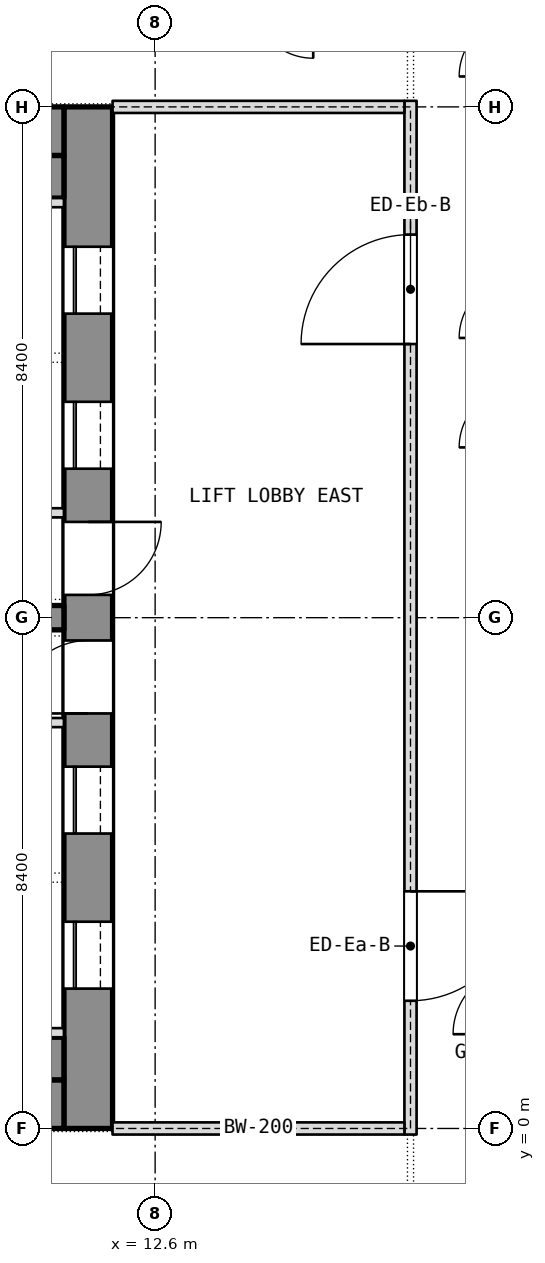
"""IFC4 building model, lengths in metres.
Left out: names, types, materials, properties, quantities, classifications, styles, units other than length and angle.
Written with IfcOpenShell. Run it as: python <this file> out.ifc"""

import sys

from ifc_helpers import new_model, si_unit, direction, frame, frame_2d, origin, place, context, subcontext, project, spatial, rectangle, extrude, element, fill, save


model = new_model("IFC4")
c1 = context("Model", 3, precision=1e-05, world=origin(), true_north=direction((0.0, 1.0)))
c2 = subcontext(c1, "Body", "Model", "MODEL_VIEW")
j1 = project(units=[si_unit("LENGTHUNIT", "METRE"), si_unit("PLANEANGLEUNIT", "RADIAN")], contexts=[c1])
p1 = place(None, origin())
s1 = spatial("IfcSite", under=j1, at=p1, CompositionType="ELEMENT")
p2 = place(p1, origin())
s2 = spatial("IfcBuilding", under=s1, at=p2, CompositionType="ELEMENT")
p3 = place(p2, frame((0.0, 0.0, 238.1)))
s3 = spatial("IfcBuildingStorey", under=s2, at=p3, CompositionType="ELEMENT", Elevation=238.1)
p4 = place(p3, frame((11.5, 0.0, 0.0), z_axis=(0.0, 0.0, 1.0), x_axis=(0.0, 1.0, 0.0)))
e1 = element("IfcWall", 1, at=p4, inside=s3, PredefinedType="SHEAR", context=c2, shape_type="SweptSolid", body=[
    extrude(rectangle(XDim=16.8, YDim=0.8, at=frame_2d((8.4, 0.0))), origin(), (0.0, 0.0, 1.0), 3.6),
])
p5 = place(p4, frame((2.3, 0.0, 0.0)))
e2 = element("IfcOpeningElement", 2, at=p5, cuts=e1, PredefinedType="OPENING", context=c2, shape_type="SweptSolid", body=[
    extrude(rectangle(XDim=1.1, YDim=2.1, at=frame_2d((0.55, 1.05))), frame((0.0, 0.4, 0.0), z_axis=(0.0, -1.0, 0.0), x_axis=(1.0, 0.0, 0.0)), (0.0, 0.0, 1.0), 0.8),
])
p6 = place(p4, frame((4.85, 0.0, 0.0)))
e3 = element("IfcOpeningElement", 3, at=p6, cuts=e1, PredefinedType="OPENING", context=c2, shape_type="SweptSolid", body=[
    extrude(rectangle(XDim=1.1, YDim=2.1, at=frame_2d((0.55, 1.05))), frame((0.0, 0.4, 0.0), z_axis=(0.0, -1.0, 0.0), x_axis=(1.0, 0.0, 0.0)), (0.0, 0.0, 1.0), 0.8),
])
p7 = place(p4, frame((6.825, 0.0, 0.0)))
e4 = element("IfcOpeningElement", 4, at=p7, cuts=e1, PredefinedType="OPENING", context=c2, shape_type="SweptSolid", body=[
    extrude(rectangle(XDim=1.2, YDim=2.1, at=frame_2d((0.6, 1.05))), frame((0.0, 0.4, 0.0), z_axis=(0.0, -1.0, 0.0), x_axis=(1.0, 0.0, 0.0)), (0.0, 0.0, 1.0), 0.8),
])
p8 = place(p4, frame((13.4, 0.0, 0.0)))
e5 = element("IfcOpeningElement", 5, at=p8, cuts=e1, PredefinedType="OPENING", context=c2, shape_type="SweptSolid", body=[
    extrude(rectangle(XDim=1.1, YDim=2.1, at=frame_2d((0.55, 1.05))), frame((0.0, 0.4, 0.0), z_axis=(0.0, -1.0, 0.0), x_axis=(1.0, 0.0, 0.0)), (0.0, 0.0, 1.0), 0.8),
])
p9 = place(p4, frame((10.85, 0.0, 0.0)))
e6 = element("IfcOpeningElement", 6, at=p9, cuts=e1, PredefinedType="OPENING", context=c2, shape_type="SweptSolid", body=[
    extrude(rectangle(XDim=1.1, YDim=2.1, at=frame_2d((0.55, 1.05))), frame((0.0, 0.4, 0.0), z_axis=(0.0, -1.0, 0.0), x_axis=(1.0, 0.0, 0.0)), (0.0, 0.0, 1.0), 0.8),
])
p10 = place(p4, frame((8.775, 0.0, 0.0)))
e7 = element("IfcOpeningElement", 7, at=p10, cuts=e1, PredefinedType="OPENING", context=c2, shape_type="SweptSolid", body=[
    extrude(rectangle(XDim=1.2, YDim=2.1, at=frame_2d((0.6, 1.05))), frame((0.0, 0.4, 0.0), z_axis=(0.0, -1.0, 0.0), x_axis=(1.0, 0.0, 0.0)), (0.0, 0.0, 1.0), 0.8),
])
for number, where, z_axis, x_axis in (
    (8, (-11.1, 0.4, 0.0), (0.0, 0.0, 1.0), (1.0, 0.0, 0.0)),
    (9, (-11.1, 16.4, 0.0), (0.0, 0.0, 1.0), (1.0, 0.0, 0.0)),
):
    element("IfcWall", number, at=place(p3, frame(where, z_axis=z_axis, x_axis=x_axis)), inside=s3, PredefinedType="SHEAR", context=c2, shape_type="SweptSolid", body=[
        extrude(rectangle(XDim=22.2, YDim=0.8, at=frame_2d((11.1, 0.0))), origin(), (0.0, 0.0, 1.0), 3.6),
    ])
p11 = place(p3, frame((4.4, 8.4, 0.0), z_axis=(0.0, 0.0, 1.0), x_axis=(1.0, 0.0, 0.0)))
e10 = element("IfcWall", 10, at=p11, inside=s3, PredefinedType="SHEAR", context=c2, shape_type="SweptSolid", body=[
    extrude(rectangle(XDim=6.7, YDim=0.4, at=frame_2d((3.35, 0.0))), origin(), (0.0, 0.0, 1.0), 3.6),
])
for number, where, z_axis, x_axis in (
    (11, (-11.1, 1.15, 0.0), (0.0, 0.0, 1.0), (1.0, 0.0, 0.0)),
    (12, (-11.1, 15.65, 0.0), (0.0, 0.0, 1.0), (1.0, 0.0, 0.0)),
):
    element("IfcWall", number, at=place(p3, frame(where, z_axis=z_axis, x_axis=x_axis)), inside=s3, PredefinedType="PARTITIONING", context=c2, shape_type="SweptSolid", body=[
        extrude(rectangle(XDim=22.2, YDim=0.7, at=frame_2d((11.1, 0.0))), origin(), (0.0, 0.0, 1.0), 3.34),
    ])
for number, where, z_axis, x_axis in (
    (13, (9.0, 6.675, 0.0), (0.0, 0.0, 1.0), (1.0, 0.0, 0.0)),
    (14, (9.0, 1.575, 0.0), (0.0, 0.0, 1.0), (1.0, 0.0, 0.0)),
    (15, (9.0, 10.125, 0.0), (0.0, 0.0, 1.0), (1.0, 0.0, 0.0)),
    (16, (9.0, 15.225, 0.0), (0.0, 0.0, 1.0), (1.0, 0.0, 0.0)),
):
    element("IfcWall", number, at=place(p3, frame(where, z_axis=z_axis, x_axis=x_axis)), inside=s3, PredefinedType="SHEAR", context=c2, shape_type="SweptSolid", body=[
        extrude(rectangle(XDim=2.1, YDim=0.15, at=frame_2d((1.05, 0.0))), origin(), (0.0, 0.0, 1.0), 3.6),
    ])
p12 = place(p3, frame((16.8, -0.1, 0.0), z_axis=(0.0, 0.0, 1.0), x_axis=(0.0, 1.0, 0.0)))
e17 = element("IfcWall", 17, at=p12, inside=s3, PredefinedType="PARTITIONING", context=c2, shape_type="SweptSolid", body=[
    extrude(rectangle(XDim=17.0, YDim=0.2, at=frame_2d((8.5, 0.0))), origin(), (0.0, 0.0, 1.0), 3.34),
])
p13 = place(p12, frame((2.2, 0.0, 0.0)))
e18 = element("IfcOpeningElement", 18, at=p13, cuts=e17, PredefinedType="OPENING", context=c2, shape_type="SweptSolid", body=[
    extrude(rectangle(XDim=1.8, YDim=2.1, at=frame_2d((0.9, 1.05))), frame((0.0, 0.1, 0.0), z_axis=(0.0, -1.0, 0.0), x_axis=(1.0, 0.0, 0.0)), (0.0, 0.0, 1.0), 0.2),
])
p14 = place(p12, frame((13.0, 0.0, 0.0)))
e19 = element("IfcOpeningElement", 19, at=p14, cuts=e17, PredefinedType="OPENING", context=c2, shape_type="SweptSolid", body=[
    extrude(rectangle(XDim=1.8, YDim=2.1, at=frame_2d((0.9, 1.05))), frame((0.0, 0.1, 0.0), z_axis=(0.0, -1.0, 0.0), x_axis=(1.0, 0.0, 0.0)), (0.0, 0.0, 1.0), 0.2),
])
for number, where, z_axis, x_axis in (
    (20, (11.9, 0.0, 0.0), (0.0, 0.0, 1.0), (1.0, 0.0, 0.0)),
    (21, (11.9, 16.8, 0.0), (0.0, 0.0, 1.0), (1.0, 0.0, 0.0)),
):
    element("IfcWall", number, at=place(p3, frame(where, z_axis=z_axis, x_axis=x_axis)), inside=s3, PredefinedType="PARTITIONING", context=c2, shape_type="SweptSolid", body=[
        extrude(rectangle(XDim=4.8, YDim=0.2, at=frame_2d((2.4, 0.0))), origin(), (0.0, 0.0, 1.0), 2.94),
    ])
p15 = place(p5, origin())
e22 = element("IfcDoor", 22, at=p15, inside=s3, OperationType="SLIDING_TO_LEFT", PredefinedType="DOOR", context=c2, shape_type="SweptSolid", body=[
    extrude(rectangle(XDim=1.1, YDim=2.1, at=frame_2d((0.55, 1.05))), frame((0.0, 0.025, 0.0), z_axis=(0.0, -1.0, 0.0), x_axis=(1.0, 0.0, 0.0)), (0.0, 0.0, 1.0), 0.05),
])
fill(e2, e22)
p16 = place(p6, origin())
e23 = element("IfcDoor", 23, at=p16, inside=s3, OperationType="SLIDING_TO_LEFT", PredefinedType="DOOR", context=c2, shape_type="SweptSolid", body=[
    extrude(rectangle(XDim=1.1, YDim=2.1, at=frame_2d((0.55, 1.05))), frame((0.0, 0.025, 0.0), z_axis=(0.0, -1.0, 0.0), x_axis=(1.0, 0.0, 0.0)), (0.0, 0.0, 1.0), 0.05),
])
fill(e3, e23)
p17 = place(p7, origin())
e24 = element("IfcDoor", 24, at=p17, inside=s3, OperationType="SINGLE_SWING_LEFT", PredefinedType="DOOR", context=c2, shape_type="SweptSolid", body=[
    extrude(rectangle(XDim=1.2, YDim=2.1, at=frame_2d((0.6, 1.05))), frame((0.0, 0.025, 0.0), z_axis=(0.0, -1.0, 0.0), x_axis=(1.0, 0.0, 0.0)), (0.0, 0.0, 1.0), 0.05),
])
fill(e4, e24)
p18 = place(p8, origin())
e25 = element("IfcDoor", 25, at=p18, inside=s3, OperationType="SLIDING_TO_LEFT", PredefinedType="DOOR", context=c2, shape_type="SweptSolid", body=[
    extrude(rectangle(XDim=1.1, YDim=2.1, at=frame_2d((0.55, 1.05))), frame((0.0, 0.025, 0.0), z_axis=(0.0, -1.0, 0.0), x_axis=(1.0, 0.0, 0.0)), (0.0, 0.0, 1.0), 0.05),
])
fill(e5, e25)
p19 = place(p9, origin())
e26 = element("IfcDoor", 26, at=p19, inside=s3, OperationType="SLIDING_TO_LEFT", PredefinedType="DOOR", context=c2, shape_type="SweptSolid", body=[
    extrude(rectangle(XDim=1.1, YDim=2.1, at=frame_2d((0.55, 1.05))), frame((0.0, 0.025, 0.0), z_axis=(0.0, -1.0, 0.0), x_axis=(1.0, 0.0, 0.0)), (0.0, 0.0, 1.0), 0.05),
])
fill(e6, e26)
p20 = place(p10, origin())
e27 = element("IfcDoor", 27, at=p20, inside=s3, OperationType="SINGLE_SWING_LEFT", PredefinedType="DOOR", context=c2, shape_type="SweptSolid", body=[
    extrude(rectangle(XDim=1.2, YDim=2.1, at=frame_2d((0.6, 1.05))), frame((0.0, 0.025, 0.0), z_axis=(0.0, -1.0, 0.0), x_axis=(1.0, 0.0, 0.0)), (0.0, 0.0, 1.0), 0.05),
])
fill(e7, e27)
p21 = place(p13, origin())
e28 = element("IfcDoor", 28, at=p21, inside=s3, OperationType="DOUBLE_DOOR_SINGLE_SWING", PredefinedType="DOOR", context=c2, shape_type="SweptSolid", body=[
    extrude(rectangle(XDim=1.8, YDim=2.1, at=frame_2d((0.9, 1.05))), frame((0.0, 0.025, 0.0), z_axis=(0.0, -1.0, 0.0), x_axis=(1.0, 0.0, 0.0)), (0.0, 0.0, 1.0), 0.05),
])
fill(e18, e28)
p22 = place(p14, origin())
e29 = element("IfcDoor", 29, at=p22, inside=s3, OperationType="DOUBLE_DOOR_SINGLE_SWING", PredefinedType="DOOR", context=c2, shape_type="SweptSolid", body=[
    extrude(rectangle(XDim=1.8, YDim=2.1, at=frame_2d((0.9, 1.05))), frame((0.0, 0.025, 0.0), z_axis=(0.0, -1.0, 0.0), x_axis=(1.0, 0.0, 0.0)), (0.0, 0.0, 1.0), 0.05),
])
fill(e19, e29)
save(model, sys.argv[1])
